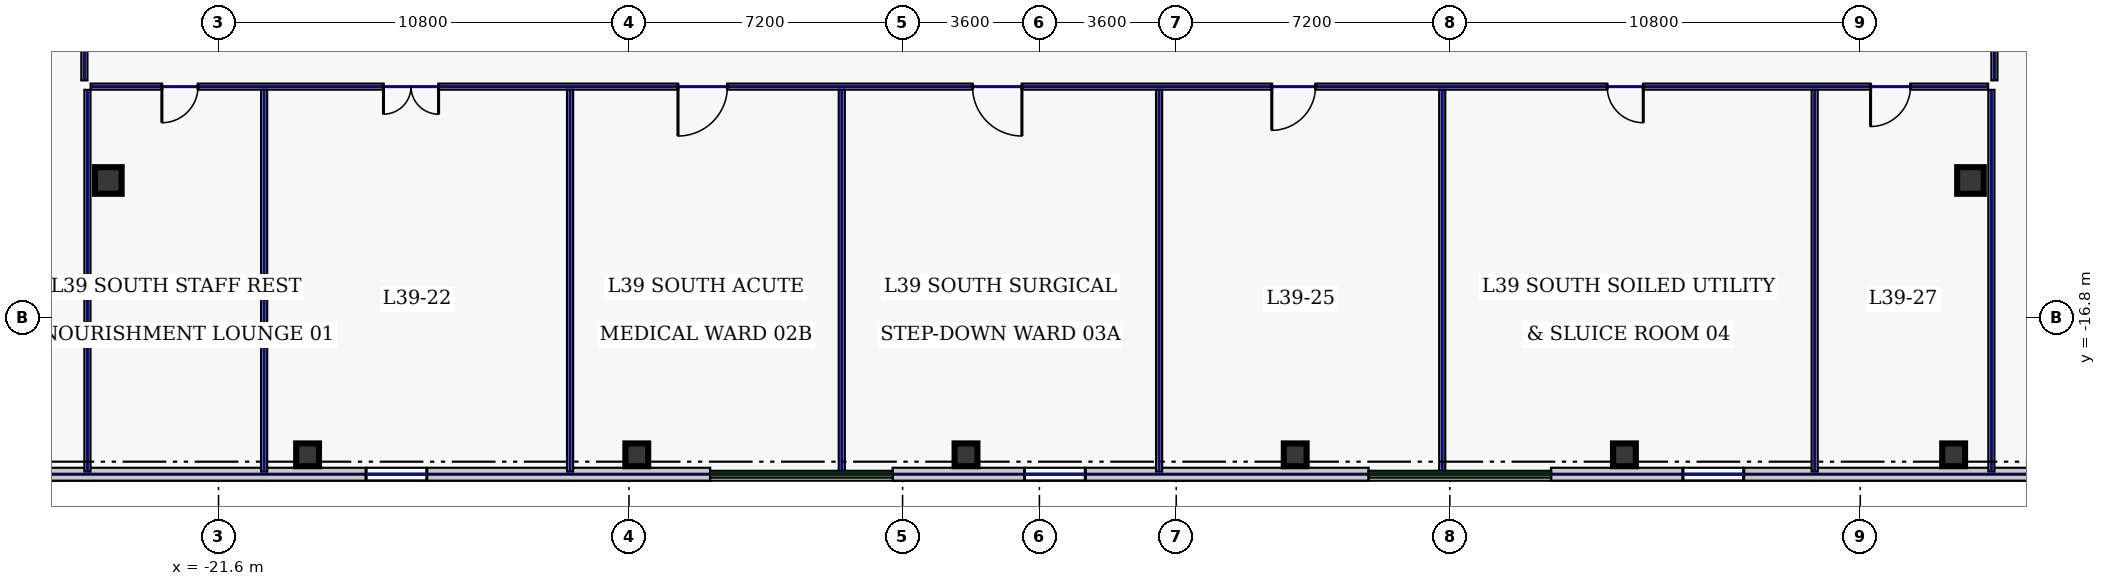
"""IFC4 building model, lengths in metres.
Left out: names, types, materials, properties, quantities, classifications, styles, units other than length and angle.
Written with IfcOpenShell. Run it as: python <this file> out.ifc"""

import sys

from ifc_helpers import new_model, si_unit, direction, frame, frame_2d, origin, origin_2d, place, context, subcontext, project, spatial, rectangle, hollow_rectangle, extrude, element, fill, save


model = new_model("IFC4")
c1 = context("Model", 3, precision=1e-05, world=origin(), true_north=direction((0.0, 1.0)))
c2 = subcontext(c1, "Body", "Model", "MODEL_VIEW")
j1 = project(units=[si_unit("LENGTHUNIT", "METRE"), si_unit("PLANEANGLEUNIT", "RADIAN")], contexts=[c1])
p1 = place(None, origin())
s1 = spatial("IfcSite", under=j1, at=p1, CompositionType="ELEMENT")
p2 = place(p1, origin())
s2 = spatial("IfcBuilding", under=s1, at=p2, CompositionType="ELEMENT")
p3 = place(p2, frame((0.0, 0.0, 172.2)))
s3 = spatial("IfcBuildingStorey", under=s2, at=p3, CompositionType="ELEMENT", Elevation=172.2)
for number, where, z_axis, x_axis in (
    (1, (-24.5, -13.2, 0.0), (0.0, 0.0, 1.0), (1.0, 0.0, 0.0)),
    (2, (24.5, -13.2, 0.0), (0.0, 0.0, 1.0), (1.0, 0.0, 0.0)),
):
    element("IfcColumn", number, at=place(p3, frame(where, z_axis=z_axis, x_axis=x_axis)), inside=s3, PredefinedType="COLUMN", context=c2, shape_type="SweptSolid", body=[
        extrude(hollow_rectangle(XDim=0.7, YDim=0.7, WallThickness=0.032, at=origin_2d()), origin(), (0.0, 0.0, 1.0), 3.74),
    ])
for number, where, z_axis, x_axis in (
    (3, (-19.257, -20.42, 0.0), (0.0, 0.0, 1.0), (1.0, 0.0, 0.0)),
    (4, (-10.594, -20.42, 0.0), (0.0, 0.0, 1.0), (1.0, 0.0, 0.0)),
    (5, (-1.931, -20.42, 0.0), (0.0, 0.0, 1.0), (1.0, 0.0, 0.0)),
    (6, (6.731, -20.42, 0.0), (0.0, 0.0, 1.0), (1.0, 0.0, 0.0)),
    (7, (15.394, -20.42, 0.0), (0.0, 0.0, 1.0), (1.0, 0.0, 0.0)),
    (8, (24.057, -20.42, 0.0), (0.0, 0.0, 1.0), (1.0, 0.0, 0.0)),
):
    element("IfcColumn", number, at=place(p3, frame(where, z_axis=z_axis, x_axis=x_axis)), inside=s3, PredefinedType="COLUMN", context=c2, shape_type="SweptSolid", body=[
        extrude(hollow_rectangle(XDim=0.6, YDim=0.6, WallThickness=0.028, at=origin_2d()), origin(), (0.0, 0.0, 1.0), 3.74),
    ])
p4 = place(p3, frame((-28.6, -20.93, 0.0), z_axis=(0.0, 0.0, 1.0), x_axis=(1.0, 0.0, 0.0)))
e9 = element("IfcWall", 9, at=p4, inside=s3, PredefinedType="STANDARD", context=c2, shape_type="SweptSolid", body=[
    extrude(rectangle(XDim=19.937, YDim=0.34, at=frame_2d((9.969, 0.0))), origin(), (0.0, 0.0, 1.0), 3.74),
])
p5 = place(p4, frame((10.882, 0.0, 0.22)))
e10 = element("IfcOpeningElement", 10, at=p5, cuts=e9, PredefinedType="OPENING", context=c2, shape_type="SweptSolid", body=[
    extrude(rectangle(XDim=1.6, YDim=1.2, at=frame_2d((0.8, 0.6))), frame((0.0, 0.18, 0.0), z_axis=(0.0, -1.0, 0.0), x_axis=(1.0, 0.0, 0.0)), (0.0, 0.0, 1.0), 0.36),
])
p6 = place(p3, frame((-3.863, -20.93, 0.0), z_axis=(0.0, 0.0, 1.0), x_axis=(1.0, 0.0, 0.0)))
e11 = element("IfcWall", 11, at=p6, inside=s3, PredefinedType="STANDARD", context=c2, shape_type="SweptSolid", body=[
    extrude(rectangle(XDim=12.526, YDim=0.34, at=frame_2d((6.263, 0.0))), origin(), (0.0, 0.0, 1.0), 3.74),
])
p7 = place(p6, frame((3.47, 0.0, 0.22)))
e12 = element("IfcOpeningElement", 12, at=p7, cuts=e11, PredefinedType="OPENING", context=c2, shape_type="SweptSolid", body=[
    extrude(rectangle(XDim=1.6, YDim=1.2, at=frame_2d((0.8, 0.6))), frame((0.0, 0.18, 0.0), z_axis=(0.0, -1.0, 0.0), x_axis=(1.0, 0.0, 0.0)), (0.0, 0.0, 1.0), 0.36),
])
p8 = place(p3, frame((13.463, -20.93, 0.0), z_axis=(0.0, 0.0, 1.0), x_axis=(1.0, 0.0, 0.0)))
e13 = element("IfcWall", 13, at=p8, inside=s3, PredefinedType="STANDARD", context=c2, shape_type="SweptSolid", body=[
    extrude(rectangle(XDim=19.937, YDim=0.34, at=frame_2d((9.969, 0.0))), origin(), (0.0, 0.0, 1.0), 3.74),
])
p9 = place(p8, frame((3.47, 0.0, 0.22)))
e14 = element("IfcOpeningElement", 14, at=p9, cuts=e13, PredefinedType="OPENING", context=c2, shape_type="SweptSolid", body=[
    extrude(rectangle(XDim=1.6, YDim=1.2, at=frame_2d((0.8, 0.6))), frame((0.0, 0.18, 0.0), z_axis=(0.0, -1.0, 0.0), x_axis=(1.0, 0.0, 0.0)), (0.0, 0.0, 1.0), 0.36),
])
p10 = place(p8, frame((16.118, 0.0, 0.22)))
e15 = element("IfcOpeningElement", 15, at=p10, cuts=e13, PredefinedType="OPENING", context=c2, shape_type="SweptSolid", body=[
    extrude(rectangle(XDim=1.6, YDim=1.2, at=frame_2d((0.8, 0.6))), frame((0.0, 0.18, 0.0), z_axis=(0.0, -1.0, 0.0), x_axis=(1.0, 0.0, 0.0)), (0.0, 0.0, 1.0), 0.36),
])
p11 = place(p3, frame((-25.13, -10.565, 0.0), z_axis=(0.0, 0.0, 1.0), x_axis=(0.0, 1.0, 0.0)))
e16 = element("IfcWall", 16, at=p11, inside=s3, PredefinedType="PARTITIONING", context=c2, shape_type="SweptSolid", body=[
    extrude(rectangle(XDim=2.98, YDim=0.16, at=frame_2d((1.49, 0.0))), origin(), (0.0, 0.0, 1.0), 3.74),
])
p12 = place(p11, frame((1.1, 0.0, 0.0)))
e17 = element("IfcOpeningElement", 17, at=p12, cuts=e16, PredefinedType="OPENING", context=c2, shape_type="SweptSolid", body=[
    extrude(rectangle(XDim=0.95, YDim=2.2, at=frame_2d((0.475, 1.1))), frame((0.0, 0.09, 0.0), z_axis=(0.0, -1.0, 0.0), x_axis=(1.0, 0.0, 0.0)), (0.0, 0.0, 1.0), 0.18),
])
p13 = place(p3, frame((25.13, -7.585, 0.0), z_axis=(0.0, 0.0, 1.0), x_axis=(0.0, -1.0, 0.0)))
e18 = element("IfcWall", 18, at=p13, inside=s3, PredefinedType="PARTITIONING", context=c2, shape_type="SweptSolid", body=[
    extrude(rectangle(XDim=2.98, YDim=0.16, at=frame_2d((1.49, 0.0))), origin(), (0.0, 0.0, 1.0), 3.74),
])
p14 = place(p13, frame((1.1, 0.0, 0.0)))
e19 = element("IfcOpeningElement", 19, at=p14, cuts=e18, PredefinedType="OPENING", context=c2, shape_type="SweptSolid", body=[
    extrude(rectangle(XDim=0.95, YDim=2.2, at=frame_2d((0.475, 1.1))), frame((0.0, 0.09, 0.0), z_axis=(0.0, -1.0, 0.0), x_axis=(1.0, 0.0, 0.0)), (0.0, 0.0, 1.0), 0.18),
])
p15 = place(p3, frame((24.965, -10.73, 0.0), z_axis=(0.0, 0.0, 1.0), x_axis=(-1.0, 0.0, 0.0)))
e20 = element("IfcWall", 20, at=p15, inside=s3, PredefinedType="PARTITIONING", context=c2, shape_type="SweptSolid", body=[
    extrude(rectangle(XDim=49.93, YDim=0.16, at=frame_2d((24.965, 0.0))), origin(), (0.0, 0.0, 1.0), 3.74),
])
p16 = place(p15, frame((47.106, 0.0, 0.0)))
e21 = element("IfcOpeningElement", 21, at=p16, cuts=e20, PredefinedType="OPENING", context=c2, shape_type="SweptSolid", body=[
    extrude(rectangle(XDim=0.95, YDim=2.2, at=frame_2d((0.475, 1.1))), frame((0.0, 0.09, 0.0), z_axis=(0.0, -1.0, 0.0), x_axis=(1.0, 0.0, 0.0)), (0.0, 0.0, 1.0), 0.18),
])
p17 = place(p15, frame((40.775, 0.0, 0.0)))
e22 = element("IfcOpeningElement", 22, at=p17, cuts=e20, PredefinedType="OPENING", context=c2, shape_type="SweptSolid", body=[
    extrude(rectangle(XDim=1.45, YDim=2.2, at=frame_2d((0.725, 1.1))), frame((0.0, 0.09, 0.0), z_axis=(0.0, -1.0, 0.0), x_axis=(1.0, 0.0, 0.0)), (0.0, 0.0, 1.0), 0.18),
])
p18 = place(p15, frame((33.175, 0.0, 0.0)))
e23 = element("IfcOpeningElement", 23, at=p18, cuts=e20, PredefinedType="OPENING", context=c2, shape_type="SweptSolid", body=[
    extrude(rectangle(XDim=1.3, YDim=2.2, at=frame_2d((0.65, 1.1))), frame((0.0, 0.09, 0.0), z_axis=(0.0, -1.0, 0.0), x_axis=(1.0, 0.0, 0.0)), (0.0, 0.0, 1.0), 0.18),
])
p19 = place(p15, frame((25.425, 0.0, 0.0)))
e24 = element("IfcOpeningElement", 24, at=p19, cuts=e20, PredefinedType="OPENING", context=c2, shape_type="SweptSolid", body=[
    extrude(rectangle(XDim=1.3, YDim=2.2, at=frame_2d((0.65, 1.1))), frame((0.0, 0.09, 0.0), z_axis=(0.0, -1.0, 0.0), x_axis=(1.0, 0.0, 0.0)), (0.0, 0.0, 1.0), 0.18),
])
p20 = place(p15, frame((17.7, 0.0, 0.0)))
e25 = element("IfcOpeningElement", 25, at=p20, cuts=e20, PredefinedType="OPENING", context=c2, shape_type="SweptSolid", body=[
    extrude(rectangle(XDim=1.15, YDim=2.2, at=frame_2d((0.575, 1.1))), frame((0.0, 0.09, 0.0), z_axis=(0.0, -1.0, 0.0), x_axis=(1.0, 0.0, 0.0)), (0.0, 0.0, 1.0), 0.18),
])
p21 = place(p15, frame((9.075, 0.0, 0.0)))
e26 = element("IfcOpeningElement", 26, at=p21, cuts=e20, PredefinedType="OPENING", context=c2, shape_type="SweptSolid", body=[
    extrude(rectangle(XDim=0.95, YDim=2.2, at=frame_2d((0.475, 1.1))), frame((0.0, 0.09, 0.0), z_axis=(0.0, -1.0, 0.0), x_axis=(1.0, 0.0, 0.0)), (0.0, 0.0, 1.0), 0.18),
])
p22 = place(p15, frame((2.044, 0.0, 0.0)))
e27 = element("IfcOpeningElement", 27, at=p22, cuts=e20, PredefinedType="OPENING", context=c2, shape_type="SweptSolid", body=[
    extrude(rectangle(XDim=1.05, YDim=2.2, at=frame_2d((0.525, 1.1))), frame((0.0, 0.09, 0.0), z_axis=(0.0, -1.0, 0.0), x_axis=(1.0, 0.0, 0.0)), (0.0, 0.0, 1.0), 0.18),
])
for number, where, z_axis, x_axis in (
    (28, (-25.05, -20.86, 0.0), (0.0, 0.0, 1.0), (0.0, 1.0, 0.0)),
    (29, (25.05, -20.86, 0.0), (0.0, 0.0, 1.0), (0.0, 1.0, 0.0)),
    (30, (-20.4, -20.86, 0.0), (0.0, 0.0, 1.0), (0.0, 1.0, 0.0)),
    (31, (-5.2, -20.86, 0.0), (0.0, 0.0, 1.0), (0.0, 1.0, 0.0)),
    (32, (10.6, -20.86, 0.0), (0.0, 0.0, 1.0), (0.0, 1.0, 0.0)),
    (33, (20.4, -20.86, 0.0), (0.0, 0.0, 1.0), (0.0, 1.0, 0.0)),
    (34, (-12.35, -20.86, 0.0), (0.0, 0.0, 1.0), (0.0, 1.0, 0.0)),
    (35, (3.15, -20.86, 0.0), (0.0, 0.0, 1.0), (0.0, 1.0, 0.0)),
):
    element("IfcWall", number, at=place(p3, frame(where, z_axis=z_axis, x_axis=x_axis)), inside=s3, PredefinedType="PARTITIONING", context=c2, shape_type="SweptSolid", body=[
        extrude(rectangle(XDim=10.045, YDim=0.16, at=frame_2d((5.022, 0.0))), origin(), (0.0, 0.0, 1.0), 3.74),
    ])
p23 = place(p5, origin())
e36 = element("IfcWindow", 36, at=p23, inside=s3, PartitioningType="SINGLE_PANEL", PredefinedType="WINDOW", context=c2, shape_type="SweptSolid", body=[
    extrude(rectangle(XDim=1.6, YDim=1.2, at=frame_2d((0.8, 0.6))), frame((0.0, 0.03, 0.0), z_axis=(0.0, -1.0, 0.0), x_axis=(1.0, 0.0, 0.0)), (0.0, 0.0, 1.0), 0.06),
])
fill(e10, e36)
p24 = place(p7, origin())
e37 = element("IfcWindow", 37, at=p24, inside=s3, PartitioningType="SINGLE_PANEL", PredefinedType="WINDOW", context=c2, shape_type="SweptSolid", body=[
    extrude(rectangle(XDim=1.6, YDim=1.2, at=frame_2d((0.8, 0.6))), frame((0.0, 0.03, 0.0), z_axis=(0.0, -1.0, 0.0), x_axis=(1.0, 0.0, 0.0)), (0.0, 0.0, 1.0), 0.06),
])
fill(e12, e37)
p25 = place(p9, origin())
e38 = element("IfcWindow", 38, at=p25, inside=s3, PartitioningType="SINGLE_PANEL", PredefinedType="WINDOW", context=c2, shape_type="SweptSolid", body=[
    extrude(rectangle(XDim=1.6, YDim=1.2, at=frame_2d((0.8, 0.6))), frame((0.0, 0.03, 0.0), z_axis=(0.0, -1.0, 0.0), x_axis=(1.0, 0.0, 0.0)), (0.0, 0.0, 1.0), 0.06),
])
fill(e14, e38)
p26 = place(p16, origin())
e39 = element("IfcDoor", 39, at=p26, inside=s3, OperationType="SINGLE_SWING_RIGHT", PredefinedType="DOOR", context=c2, shape_type="SweptSolid", body=[
    extrude(rectangle(XDim=0.95, YDim=2.2, at=frame_2d((0.475, 1.1))), frame((0.0, 0.025, 0.0), z_axis=(0.0, -1.0, 0.0), x_axis=(1.0, 0.0, 0.0)), (0.0, 0.0, 1.0), 0.05),
])
fill(e21, e39)
p27 = place(p17, origin())
e40 = element("IfcDoor", 40, at=p27, inside=s3, OperationType="DOUBLE_SWING_LEFT", PredefinedType="DOOR", context=c2, shape_type="SweptSolid", body=[
    extrude(rectangle(XDim=1.45, YDim=2.2, at=frame_2d((0.725, 1.1))), frame((0.0, 0.025, 0.0), z_axis=(0.0, -1.0, 0.0), x_axis=(1.0, 0.0, 0.0)), (0.0, 0.0, 1.0), 0.05),
])
fill(e22, e40)
p28 = place(p18, origin())
e41 = element("IfcDoor", 41, at=p28, inside=s3, OperationType="SINGLE_SWING_RIGHT", PredefinedType="DOOR", context=c2, shape_type="SweptSolid", body=[
    extrude(rectangle(XDim=1.3, YDim=2.2, at=frame_2d((0.65, 1.1))), frame((0.0, 0.025, 0.0), z_axis=(0.0, -1.0, 0.0), x_axis=(1.0, 0.0, 0.0)), (0.0, 0.0, 1.0), 0.05),
])
fill(e23, e41)
p29 = place(p19, origin())
e42 = element("IfcDoor", 42, at=p29, inside=s3, OperationType="SINGLE_SWING_LEFT", PredefinedType="DOOR", context=c2, shape_type="SweptSolid", body=[
    extrude(rectangle(XDim=1.3, YDim=2.2, at=frame_2d((0.65, 1.1))), frame((0.0, 0.025, 0.0), z_axis=(0.0, -1.0, 0.0), x_axis=(1.0, 0.0, 0.0)), (0.0, 0.0, 1.0), 0.05),
])
fill(e24, e42)
p30 = place(p20, origin())
e43 = element("IfcDoor", 43, at=p30, inside=s3, OperationType="SINGLE_SWING_RIGHT", PredefinedType="DOOR", context=c2, shape_type="SweptSolid", body=[
    extrude(rectangle(XDim=1.15, YDim=2.2, at=frame_2d((0.575, 1.1))), frame((0.0, 0.025, 0.0), z_axis=(0.0, -1.0, 0.0), x_axis=(1.0, 0.0, 0.0)), (0.0, 0.0, 1.0), 0.05),
])
fill(e25, e43)
p31 = place(p21, origin())
e44 = element("IfcDoor", 44, at=p31, inside=s3, OperationType="SINGLE_SWING_LEFT", PredefinedType="DOOR", context=c2, shape_type="SweptSolid", body=[
    extrude(rectangle(XDim=0.95, YDim=2.2, at=frame_2d((0.475, 1.1))), frame((0.0, 0.025, 0.0), z_axis=(0.0, -1.0, 0.0), x_axis=(1.0, 0.0, 0.0)), (0.0, 0.0, 1.0), 0.05),
])
fill(e26, e44)
p32 = place(p22, origin())
e45 = element("IfcDoor", 45, at=p32, inside=s3, OperationType="SINGLE_SWING_RIGHT", PredefinedType="DOOR", context=c2, shape_type="SweptSolid", body=[
    extrude(rectangle(XDim=1.05, YDim=2.2, at=frame_2d((0.525, 1.1))), frame((0.0, 0.025, 0.0), z_axis=(0.0, -1.0, 0.0), x_axis=(1.0, 0.0, 0.0)), (0.0, 0.0, 1.0), 0.05),
])
fill(e27, e45)
save(model, sys.argv[1])
